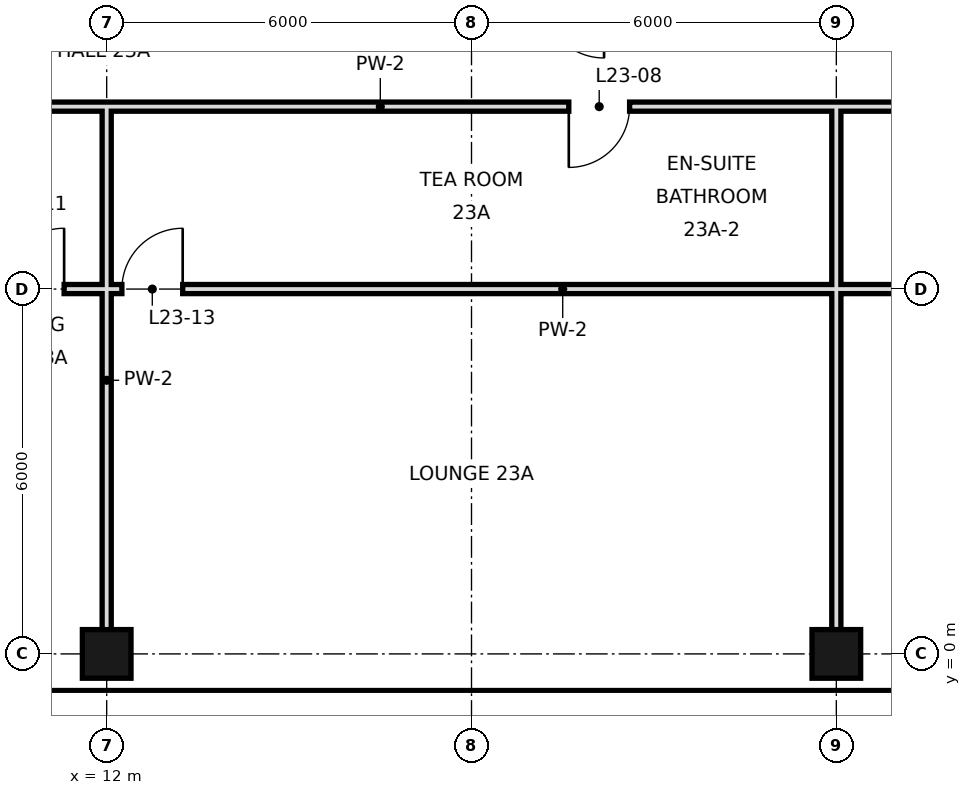
"""IFC4 building model, lengths in metres.
Left out: names, types, materials, properties, quantities, classifications, styles, units other than length and angle.
Written with IfcOpenShell. Run it as: python <this file> out.ifc"""

import sys

from ifc_helpers import new_model, si_unit, direction, frame, frame_2d, origin, origin_2d, place, context, subcontext, project, spatial, rectangle, hollow_rectangle, extrude, element, fill, save


model = new_model("IFC4")
c1 = context("Model", 3, precision=1e-05, world=origin(), true_north=direction((0.0, 1.0)))
c2 = subcontext(c1, "Body", "Model", "MODEL_VIEW")
j1 = project(units=[si_unit("LENGTHUNIT", "METRE"), si_unit("PLANEANGLEUNIT", "RADIAN")], contexts=[c1])
p1 = place(None, origin())
s1 = spatial("IfcSite", under=j1, at=p1, CompositionType="ELEMENT")
p2 = place(p1, origin())
s2 = spatial("IfcBuilding", under=s1, at=p2, CompositionType="ELEMENT")
p3 = place(p2, frame((0.0, 0.0, 107.0)))
s3 = spatial("IfcBuildingStorey", under=s2, at=p3, CompositionType="ELEMENT", Elevation=107.0)
for number, where, z_axis, x_axis in (
    (1, (12.0, 0.0, 0.0), (0.0, 0.0, 1.0), (1.0, 0.0, 0.0)),
    (2, (24.0, 0.0, 0.0), (0.0, 0.0, 1.0), (1.0, 0.0, 0.0)),
):
    element("IfcColumn", number, at=place(p3, frame(where, z_axis=z_axis, x_axis=x_axis)), inside=s3, PredefinedType="COLUMN", context=c2, shape_type="SweptSolid", body=[
        extrude(hollow_rectangle(XDim=0.8, YDim=0.8, WallThickness=0.04, at=origin_2d()), origin(), (0.0, 0.0, 1.0), 3.6),
    ])
p4 = place(p3, frame((12.0, 0.0, 0.0), z_axis=(0.0, 0.0, 1.0), x_axis=(0.0, 1.0, 0.0)))
e3 = element("IfcWall", 3, at=p4, inside=s3, PredefinedType="PARTITIONING", context=c2, shape_type="SweptSolid", body=[
    extrude(rectangle(XDim=9.0, YDim=0.15, at=frame_2d((4.5, 0.0))), origin(), (0.0, 0.0, 1.0), 2.72),
])
p5 = place(p3, frame((24.0, 0.0, 0.0), z_axis=(0.0, 0.0, 1.0), x_axis=(0.0, 1.0, 0.0)))
e4 = element("IfcWall", 4, at=p5, inside=s3, PredefinedType="PARTITIONING", context=c2, shape_type="SweptSolid", body=[
    extrude(rectangle(XDim=6.0, YDim=0.15, at=frame_2d((3.0, 0.0))), origin(), (0.0, 0.0, 1.0), 2.72),
])
p6 = place(p3, frame((24.0, 6.0, 0.0), z_axis=(0.0, 0.0, 1.0), x_axis=(0.0, 1.0, 0.0)))
e5 = element("IfcWall", 5, at=p6, inside=s3, PredefinedType="PARTITIONING", context=c2, shape_type="SweptSolid", body=[
    extrude(rectangle(XDim=3.0, YDim=0.15, at=frame_2d((1.5, 0.0))), origin(), (0.0, 0.0, 1.0), 2.72),
])
p7 = place(p3, frame((9.0, 6.0, 0.0), z_axis=(0.0, 0.0, 1.0), x_axis=(1.0, 0.0, 0.0)))
e6 = element("IfcWall", 6, at=p7, inside=s3, PredefinedType="PARTITIONING", context=c2, shape_type="SweptSolid", body=[
    extrude(rectangle(XDim=15.0, YDim=0.15, at=frame_2d((7.5, 0.0))), origin(), (0.0, 0.0, 1.0), 2.97),
])
p8 = place(p7, frame((1.3, 0.0, 0.0)))
e7 = element("IfcOpeningElement", 7, at=p8, cuts=e6, PredefinedType="OPENING", context=c2, shape_type="SweptSolid", body=[
    extrude(rectangle(XDim=1.0, YDim=2.4, at=frame_2d((0.5, 1.2))), frame((0.0, 0.085, 0.0), z_axis=(0.0, -1.0, 0.0), x_axis=(1.0, 0.0, 0.0)), (0.0, 0.0, 1.0), 0.17),
])
p9 = place(p7, frame((3.25, 0.0, 0.0)))
e8 = element("IfcOpeningElement", 8, at=p9, cuts=e6, PredefinedType="OPENING", context=c2, shape_type="SweptSolid", body=[
    extrude(rectangle(XDim=1.0, YDim=2.4, at=frame_2d((0.5, 1.2))), frame((0.0, 0.085, 0.0), z_axis=(0.0, -1.0, 0.0), x_axis=(1.0, 0.0, 0.0)), (0.0, 0.0, 1.0), 0.17),
])
p10 = place(p3, frame((24.0, 6.0, 0.0), z_axis=(0.0, 0.0, 1.0), x_axis=(1.0, 0.0, 0.0)))
e9 = element("IfcWall", 9, at=p10, inside=s3, PredefinedType="PARTITIONING", context=c2, shape_type="SweptSolid", body=[
    extrude(rectangle(XDim=2.4, YDim=0.15, at=frame_2d((1.2, 0.0))), origin(), (0.0, 0.0, 1.0), 2.97),
])
p11 = place(p10, frame((1.25, 0.0, 0.0)))
e10 = element("IfcOpeningElement", 10, at=p11, cuts=e9, PredefinedType="OPENING", context=c2, shape_type="SweptSolid", body=[
    extrude(rectangle(XDim=0.9, YDim=2.4, at=frame_2d((0.45, 1.2))), frame((0.0, 0.085, 0.0), z_axis=(0.0, -1.0, 0.0), x_axis=(1.0, 0.0, 0.0)), (0.0, 0.0, 1.0), 0.17),
])
p12 = place(p3, frame((9.0, 9.0, 0.0), z_axis=(0.0, 0.0, 1.0), x_axis=(1.0, 0.0, 0.0)))
e11 = element("IfcWall", 11, at=p12, inside=s3, PredefinedType="PARTITIONING", context=c2, shape_type="SweptSolid", body=[
    extrude(rectangle(XDim=15.0, YDim=0.15, at=frame_2d((7.5, 0.0))), origin(), (0.0, 0.0, 1.0), 3.42),
])
p13 = place(p12, frame((1.0, 0.0, 0.0)))
e12 = element("IfcOpeningElement", 12, at=p13, cuts=e11, PredefinedType="OPENING", context=c2, shape_type="SweptSolid", body=[
    extrude(rectangle(XDim=1.0, YDim=2.4, at=frame_2d((0.5, 1.2))), frame((0.0, 0.085, 0.0), z_axis=(0.0, -1.0, 0.0), x_axis=(1.0, 0.0, 0.0)), (0.0, 0.0, 1.0), 0.17),
])
p14 = place(p12, frame((10.6, 0.0, 0.0)))
e13 = element("IfcOpeningElement", 13, at=p14, cuts=e11, PredefinedType="OPENING", context=c2, shape_type="SweptSolid", body=[
    extrude(rectangle(XDim=1.0, YDim=2.4, at=frame_2d((0.5, 1.2))), frame((0.0, 0.085, 0.0), z_axis=(0.0, -1.0, 0.0), x_axis=(1.0, 0.0, 0.0)), (0.0, 0.0, 1.0), 0.17),
])
p15 = place(p3, frame((24.0, 9.0, 0.0), z_axis=(0.0, 0.0, 1.0), x_axis=(1.0, 0.0, 0.0)))
e14 = element("IfcWall", 14, at=p15, inside=s3, PredefinedType="PARTITIONING", context=c2, shape_type="SweptSolid", body=[
    extrude(rectangle(XDim=2.4, YDim=0.15, at=frame_2d((1.2, 0.0))), origin(), (0.0, 0.0, 1.0), 3.42),
])
p16 = place(p14, frame((1.0, 0.0, 0.0), z_axis=(0.0, 0.0, 1.0), x_axis=(-1.0, 0.0, 0.0)))
e15 = element("IfcDoor", 15, at=p16, inside=s3, OperationType="SINGLE_SWING_RIGHT", PredefinedType="DOOR", context=c2, shape_type="SweptSolid", body=[
    extrude(rectangle(XDim=1.0, YDim=2.4, at=frame_2d((0.5, 1.2))), frame((0.0, 0.025, 0.0), z_axis=(0.0, -1.0, 0.0), x_axis=(1.0, 0.0, 0.0)), (0.0, 0.0, 1.0), 0.05),
])
fill(e13, e15)
p17 = place(p8, frame((1.0, 0.0, 0.0), z_axis=(0.0, 0.0, 1.0), x_axis=(-1.0, 0.0, 0.0)))
e16 = element("IfcDoor", 16, at=p17, inside=s3, OperationType="SINGLE_SWING_LEFT", PredefinedType="DOOR", context=c2, shape_type="SweptSolid", body=[
    extrude(rectangle(XDim=1.0, YDim=2.4, at=frame_2d((0.5, 1.2))), frame((0.0, 0.025, 0.0), z_axis=(0.0, -1.0, 0.0), x_axis=(1.0, 0.0, 0.0)), (0.0, 0.0, 1.0), 0.05),
])
fill(e7, e16)
p18 = place(p9, frame((1.0, 0.0, 0.0), z_axis=(0.0, 0.0, 1.0), x_axis=(-1.0, 0.0, 0.0)))
e17 = element("IfcDoor", 17, at=p18, inside=s3, OperationType="SINGLE_SWING_LEFT", PredefinedType="DOOR", context=c2, shape_type="SweptSolid", body=[
    extrude(rectangle(XDim=1.0, YDim=2.4, at=frame_2d((0.5, 1.2))), frame((0.0, 0.025, 0.0), z_axis=(0.0, -1.0, 0.0), x_axis=(1.0, 0.0, 0.0)), (0.0, 0.0, 1.0), 0.05),
])
fill(e8, e17)
save(model, sys.argv[1])
